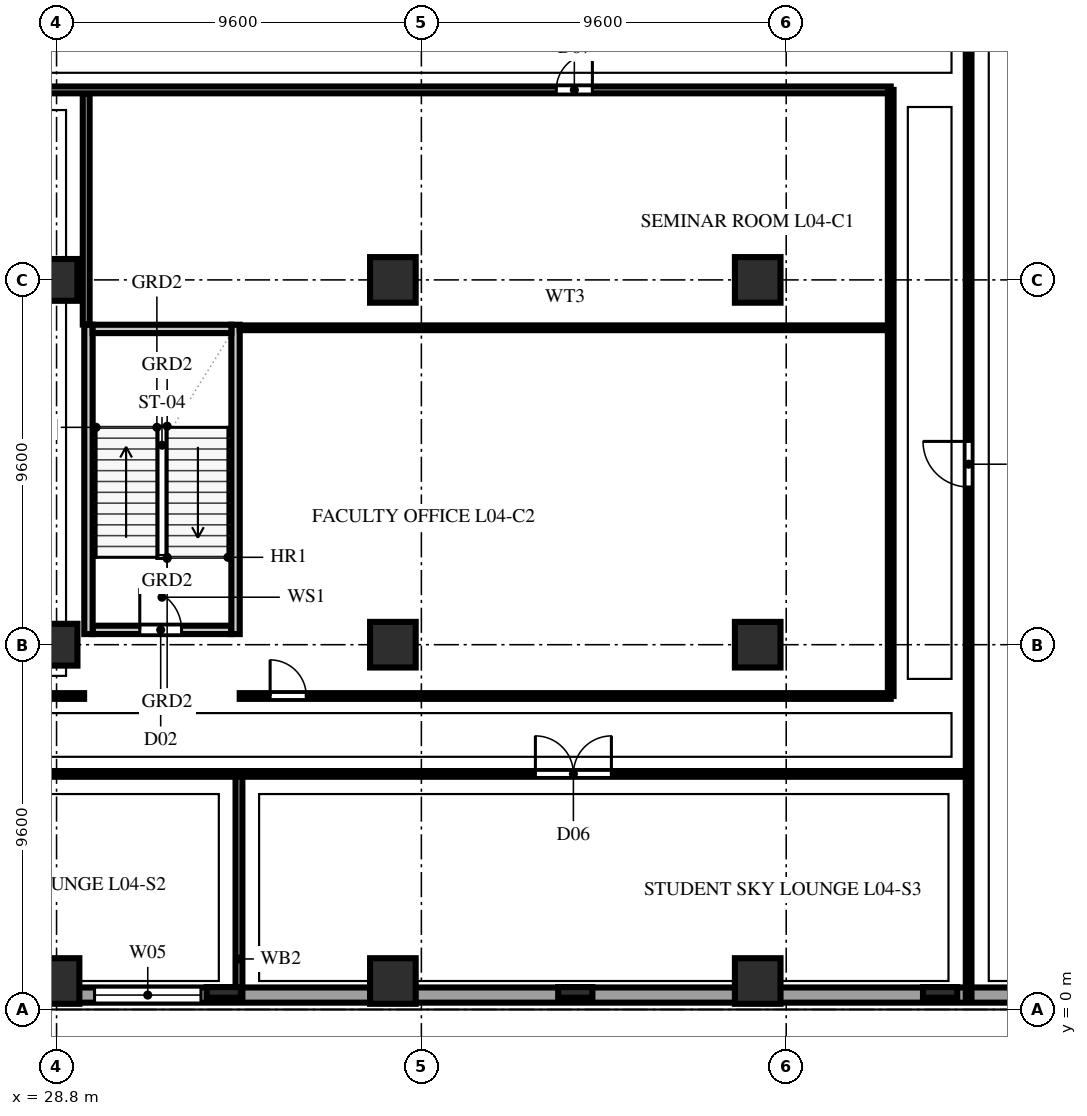
"""IFC4 building model, lengths in metres.
Left out: names, types, materials, properties, quantities, classifications, styles, units other than length and angle.
Written with IfcOpenShell. Run it as: python <this file> out.ifc"""

import sys

from ifc_helpers import new_model, si_unit, direction, frame, frame_2d, origin, origin_2d, place, context, subcontext, project, spatial, rectangle, extrude, element, fill, save


model = new_model("IFC4")
c1 = context("Model", 3, precision=1e-05, world=origin(), true_north=direction((0.0, 1.0)))
c2 = subcontext(c1, "Body", "Model", "MODEL_VIEW")
j1 = project(units=[si_unit("LENGTHUNIT", "METRE"), si_unit("PLANEANGLEUNIT", "RADIAN")], contexts=[c1])
p1 = place(None, origin())
s1 = spatial("IfcSite", under=j1, at=p1, CompositionType="ELEMENT")
p2 = place(p1, origin())
s2 = spatial("IfcBuilding", under=s1, at=p2, CompositionType="ELEMENT")
p3 = place(p2, frame((0.0, 0.0, 19.6)))
s3 = spatial("IfcBuildingStorey", under=s2, at=p3, CompositionType="ELEMENT", Elevation=19.6)
p4 = place(p3, frame((28.8, 0.75, 0.0), z_axis=(0.0, 0.0, 1.0), x_axis=(1.0, 0.0, 0.0)))
e1 = element("IfcColumn", 1, at=p4, inside=s3, PredefinedType="COLUMN", context=c2, shape_type="SweptSolid", body=[
    extrude(rectangle(XDim=1.2, YDim=1.2, at=origin_2d()), origin(), (0.0, 0.0, 1.0), 4.6),
])
for number, where, z_axis, x_axis in (
    (2, (28.8, 9.6, 0.0), (0.0, 0.0, 1.0), (1.0, 0.0, 0.0)),
    (3, (28.8, 19.2, 0.0), (0.0, 0.0, 1.0), (1.0, 0.0, 0.0)),
):
    element("IfcColumn", number, at=place(p3, frame(where, z_axis=z_axis, x_axis=x_axis)), inside=s3, PredefinedType="COLUMN", context=c2, shape_type="SweptSolid", body=[
        extrude(rectangle(XDim=1.1, YDim=1.1, at=origin_2d()), origin(), (0.0, 0.0, 1.0), 4.6),
    ])
for number, where, z_axis, x_axis in (
    (4, (37.65, 0.75, 0.0), (0.0, 0.0, 1.0), (1.0, 0.0, 0.0)),
    (5, (37.65, 9.6, 0.0), (0.0, 0.0, 1.0), (1.0, 0.0, 0.0)),
    (6, (37.65, 19.2, 0.0), (0.0, 0.0, 1.0), (1.0, 0.0, 0.0)),
    (7, (47.25, 0.75, 0.0), (0.0, 0.0, 1.0), (1.0, 0.0, 0.0)),
    (8, (47.25, 9.6, 0.0), (0.0, 0.0, 1.0), (1.0, 0.0, 0.0)),
    (9, (47.25, 19.2, 0.0), (0.0, 0.0, 1.0), (1.0, 0.0, 0.0)),
):
    element("IfcColumn", number, at=place(p3, frame(where, z_axis=z_axis, x_axis=x_axis)), inside=s3, PredefinedType="COLUMN", context=c2, shape_type="SweptSolid", body=[
        extrude(rectangle(XDim=1.2, YDim=1.2, at=origin_2d()), origin(), (0.0, 0.0, 1.0), 4.6),
    ])
for number, where, z_axis, x_axis in (
    (10, (33.2, 0.45, 0.0), (0.0, 0.0, 1.0), (1.0, 0.0, 0.0)),
    (11, (42.45, 0.45, 0.0), (0.0, 0.0, 1.0), (1.0, 0.0, 0.0)),
    (12, (52.05, 0.45, 0.0), (0.0, 0.0, 1.0), (1.0, 0.0, 0.0)),
):
    element("IfcColumn", number, at=place(p3, frame(where, z_axis=z_axis, x_axis=x_axis)), inside=s3, PredefinedType="PILASTER", context=c2, shape_type="SweptSolid", body=[
        extrude(rectangle(XDim=0.9, YDim=0.28, at=origin_2d()), origin(), (0.0, 0.0, 1.0), 4.6),
    ])
p5 = place(p3, frame((1.84, 0.38, 0.0), z_axis=(0.0, 0.0, 1.0), x_axis=(1.0, 0.0, 0.0)))
e13 = element("IfcWall", 13, at=p5, inside=s3, PredefinedType="SOLIDWALL", context=c2, shape_type="SweptSolid", body=[
    extrude(rectangle(XDim=63.52, YDim=0.4, at=frame_2d((31.76, 0.0))), origin(), (0.0, 0.0, 1.0), 4.34),
])
p6 = place(p5, frame((3.96, 0.0, 0.75)))
e14 = element("IfcOpeningElement", 14, at=p6, cuts=e13, PredefinedType="OPENING", context=c2, shape_type="SweptSolid", body=[
    extrude(rectangle(XDim=2.8, YDim=2.3, at=frame_2d((1.4, 1.15))), frame((0.0, 0.212, 0.0), z_axis=(0.0, -1.0, 0.0), x_axis=(1.0, 0.0, 0.0)), (0.0, 0.0, 1.0), 0.424),
])
p7 = place(p5, frame((8.76, 0.0, 0.75)))
e15 = element("IfcOpeningElement", 15, at=p7, cuts=e13, PredefinedType="OPENING", context=c2, shape_type="SweptSolid", body=[
    extrude(rectangle(XDim=2.8, YDim=2.3, at=frame_2d((1.4, 1.15))), frame((0.0, 0.212, 0.0), z_axis=(0.0, -1.0, 0.0), x_axis=(1.0, 0.0, 0.0)), (0.0, 0.0, 1.0), 0.424),
])
p8 = place(p5, frame((13.56, 0.0, 0.75)))
e16 = element("IfcOpeningElement", 16, at=p8, cuts=e13, PredefinedType="OPENING", context=c2, shape_type="SweptSolid", body=[
    extrude(rectangle(XDim=2.8, YDim=2.3, at=frame_2d((1.4, 1.15))), frame((0.0, 0.212, 0.0), z_axis=(0.0, -1.0, 0.0), x_axis=(1.0, 0.0, 0.0)), (0.0, 0.0, 1.0), 0.424),
])
p9 = place(p5, frame((18.36, 0.0, 0.75)))
e17 = element("IfcOpeningElement", 17, at=p9, cuts=e13, PredefinedType="OPENING", context=c2, shape_type="SweptSolid", body=[
    extrude(rectangle(XDim=2.8, YDim=2.3, at=frame_2d((1.4, 1.15))), frame((0.0, 0.212, 0.0), z_axis=(0.0, -1.0, 0.0), x_axis=(1.0, 0.0, 0.0)), (0.0, 0.0, 1.0), 0.424),
])
p10 = place(p5, frame((23.16, 0.0, 0.75)))
e18 = element("IfcOpeningElement", 18, at=p10, cuts=e13, PredefinedType="OPENING", context=c2, shape_type="SweptSolid", body=[
    extrude(rectangle(XDim=2.8, YDim=2.3, at=frame_2d((1.4, 1.15))), frame((0.0, 0.212, 0.0), z_axis=(0.0, -1.0, 0.0), x_axis=(1.0, 0.0, 0.0)), (0.0, 0.0, 1.0), 0.424),
])
p11 = place(p5, frame((27.96, 0.0, 0.75)))
e19 = element("IfcOpeningElement", 19, at=p11, cuts=e13, PredefinedType="OPENING", context=c2, shape_type="SweptSolid", body=[
    extrude(rectangle(XDim=2.8, YDim=2.3, at=frame_2d((1.4, 1.15))), frame((0.0, 0.212, 0.0), z_axis=(0.0, -1.0, 0.0), x_axis=(1.0, 0.0, 0.0)), (0.0, 0.0, 1.0), 0.424),
])
p12 = place(p3, frame((29.75, 9.99, 0.0), z_axis=(0.0, 0.0, 1.0), x_axis=(1.0, 0.0, 0.0)))
e20 = element("IfcWall", 20, at=p12, inside=s3, PredefinedType="SOLIDWALL", context=c2, shape_type="SweptSolid", body=[
    extrude(rectangle(XDim=3.65, YDim=0.22, at=frame_2d((1.825, 0.0))), origin(), (0.0, 0.0, 1.0), 4.34),
])
p13 = place(p12, frame((1.24, 0.0, 0.0)))
e21 = element("IfcOpeningElement", 21, at=p13, cuts=e20, PredefinedType="OPENING", context=c2, shape_type="SweptSolid", body=[
    extrude(rectangle(XDim=1.1, YDim=2.2, at=frame_2d((0.55, 1.1))), frame((0.0, 0.122, 0.0), z_axis=(0.0, -1.0, 0.0), x_axis=(1.0, 0.0, 0.0)), (0.0, 0.0, 1.0), 0.244),
])
for number, where, z_axis, x_axis in (
    (22, (29.64, 9.88, 0.0), (0.0, 0.0, 1.0), (0.0, 1.0, 0.0)),
    (23, (33.51, 9.88, 0.0), (0.0, 0.0, 1.0), (0.0, 1.0, 0.0)),
):
    element("IfcWall", number, at=place(p3, frame(where, z_axis=z_axis, x_axis=x_axis)), inside=s3, PredefinedType="SOLIDWALL", context=c2, shape_type="SweptSolid", body=[
        extrude(rectangle(XDim=8.14, YDim=0.22, at=frame_2d((4.07, 0.0))), origin(), (0.0, 0.0, 1.0), 4.34),
    ])
p14 = place(p3, frame((29.75, 17.91, 0.0), z_axis=(0.0, 0.0, 1.0), x_axis=(1.0, 0.0, 0.0)))
e24 = element("IfcWall", 24, at=p14, inside=s3, PredefinedType="SOLIDWALL", context=c2, shape_type="SweptSolid", body=[
    extrude(rectangle(XDim=3.65, YDim=0.22, at=frame_2d((1.825, 0.0))), origin(), (0.0, 0.0, 1.0), 4.34),
])
p15 = place(p3, frame((33.6, 0.22, 0.0), z_axis=(0.0, 0.0, 1.0), x_axis=(0.0, 1.0, 0.0)))
e25 = element("IfcWall", 25, at=p15, inside=s3, PredefinedType="PARTITIONING", context=c2, shape_type="SweptSolid", body=[
    extrude(rectangle(XDim=5.98, YDim=0.18, at=frame_2d((2.99, 0.0))), origin(), (0.0, 0.0, 1.0), 4.34),
])
p16 = place(p3, frame((0.22, 6.2, 0.0), z_axis=(0.0, 0.0, 1.0), x_axis=(1.0, 0.0, 0.0)))
e26 = element("IfcWall", 26, at=p16, inside=s3, PredefinedType="PARTITIONING", context=c2, shape_type="SweptSolid", body=[
    extrude(rectangle(XDim=52.58, YDim=0.15, at=frame_2d((26.29, 0.0))), origin(), (0.0, 0.0, 1.0), 4.34),
])
p17 = place(p16, frame((13.58, 0.0, 0.0)))
e27 = element("IfcOpeningElement", 27, at=p17, cuts=e26, PredefinedType="OPENING", context=c2, shape_type="SweptSolid", body=[
    extrude(rectangle(XDim=1.2, YDim=2.2, at=frame_2d((0.6, 1.1))), frame((0.0, 0.087, 0.0), z_axis=(0.0, -1.0, 0.0), x_axis=(1.0, 0.0, 0.0)), (0.0, 0.0, 1.0), 0.174),
])
p18 = place(p16, frame((23.28, 0.0, 0.0)))
e28 = element("IfcOpeningElement", 28, at=p18, cuts=e26, PredefinedType="OPENING", context=c2, shape_type="SweptSolid", body=[
    extrude(rectangle(XDim=1.2, YDim=2.2, at=frame_2d((0.6, 1.1))), frame((0.0, 0.087, 0.0), z_axis=(0.0, -1.0, 0.0), x_axis=(1.0, 0.0, 0.0)), (0.0, 0.0, 1.0), 0.174),
])
p19 = place(p16, frame((41.18, 0.0, 0.0)))
e29 = element("IfcOpeningElement", 29, at=p19, cuts=e26, PredefinedType="OPENING", context=c2, shape_type="SweptSolid", body=[
    extrude(rectangle(XDim=2.0, YDim=2.3, at=frame_2d((1.0, 1.15))), frame((0.0, 0.087, 0.0), z_axis=(0.0, -1.0, 0.0), x_axis=(1.0, 0.0, 0.0)), (0.0, 0.0, 1.0), 0.174),
])
p20 = place(p3, frame((52.8, 0.22, 0.0), z_axis=(0.0, 0.0, 1.0), x_axis=(0.0, 1.0, 0.0)))
e30 = element("IfcWall", 30, at=p20, inside=s3, PredefinedType="PARTITIONING", context=c2, shape_type="SweptSolid", body=[
    extrude(rectangle(XDim=37.96, YDim=0.15, at=frame_2d((18.98, 0.0))), origin(), (0.0, 0.0, 1.0), 4.34),
])
p21 = place(p20, frame((13.53, 0.0, 0.0)))
e31 = element("IfcOpeningElement", 31, at=p21, cuts=e30, PredefinedType="OPENING", context=c2, shape_type="SweptSolid", body=[
    extrude(rectangle(XDim=1.2, YDim=2.2, at=frame_2d((0.6, 1.1))), frame((0.0, 0.087, 0.0), z_axis=(0.0, -1.0, 0.0), x_axis=(1.0, 0.0, 0.0)), (0.0, 0.0, 1.0), 0.174),
])
p22 = place(p3, frame((29.58, 18.025, 0.0), z_axis=(0.0, 0.0, 1.0), x_axis=(0.0, 1.0, 0.0)))
e32 = element("IfcWall", 32, at=p22, inside=s3, PredefinedType="PARTITIONING", context=c2, shape_type="SweptSolid", body=[
    extrude(rectangle(XDim=6.08, YDim=0.18, at=frame_2d((3.04, 0.0))), origin(), (0.0, 0.0, 1.0), 4.34),
])
p23 = place(p3, frame((19.28, 24.2, 0.0), z_axis=(0.0, 0.0, 1.0), x_axis=(1.0, 0.0, 0.0)))
e33 = element("IfcWall", 33, at=p23, inside=s3, PredefinedType="PARTITIONING", context=c2, shape_type="SweptSolid", body=[
    extrude(rectangle(XDim=31.47, YDim=0.18, at=frame_2d((15.735, 0.0))), origin(), (0.0, 0.0, 1.0), 4.34),
])
p24 = place(p23, frame((22.67, 0.0, 0.0)))
e34 = element("IfcOpeningElement", 34, at=p24, cuts=e33, PredefinedType="OPENING", context=c2, shape_type="SweptSolid", body=[
    extrude(rectangle(XDim=0.95, YDim=2.15, at=frame_2d((0.475, 1.075))), frame((0.0, 0.102, 0.0), z_axis=(0.0, -1.0, 0.0), x_axis=(1.0, 0.0, 0.0)), (0.0, 0.0, 1.0), 0.204),
])
p25 = place(p3, frame((19.28, 8.25, 0.0), z_axis=(0.0, 0.0, 1.0), x_axis=(1.0, 0.0, 0.0)))
e35 = element("IfcWall", 35, at=p25, inside=s3, PredefinedType="PARTITIONING", context=c2, shape_type="SweptSolid", body=[
    extrude(rectangle(XDim=10.245, YDim=0.15, at=frame_2d((5.123, 0.0))), origin(), (0.0, 0.0, 1.0), 4.34),
])
p26 = place(p3, frame((33.62, 17.94, 0.0), z_axis=(0.0, 0.0, 1.0), x_axis=(1.0, 0.0, 0.0)))
e36 = element("IfcWall", 36, at=p26, inside=s3, PredefinedType="PARTITIONING", context=c2, shape_type="SweptSolid", body=[
    extrude(rectangle(XDim=17.13, YDim=0.125, at=frame_2d((8.565, 0.0))), origin(), (0.0, 0.0, 1.0), 4.34),
])
p27 = place(p3, frame((33.62, 8.25, 0.0), z_axis=(0.0, 0.0, 1.0), x_axis=(1.0, 0.0, 0.0)))
e37 = element("IfcWall", 37, at=p27, inside=s3, PredefinedType="PARTITIONING", context=c2, shape_type="SweptSolid", body=[
    extrude(rectangle(XDim=17.13, YDim=0.15, at=frame_2d((8.565, 0.0))), origin(), (0.0, 0.0, 1.0), 4.34),
])
p28 = place(p27, frame((0.8, 0.0, 0.0)))
e38 = element("IfcOpeningElement", 38, at=p28, cuts=e37, PredefinedType="OPENING", context=c2, shape_type="SweptSolid", body=[
    extrude(rectangle(XDim=0.95, YDim=2.15, at=frame_2d((0.475, 1.075))), frame((0.0, 0.087, 0.0), z_axis=(0.0, -1.0, 0.0), x_axis=(1.0, 0.0, 0.0)), (0.0, 0.0, 1.0), 0.174),
])
p29 = place(p3, frame((50.75, 8.25, 0.0), z_axis=(0.0, 0.0, 1.0), x_axis=(0.0, 1.0, 0.0)))
e39 = element("IfcWall", 39, at=p29, inside=s3, PredefinedType="PARTITIONING", context=c2, shape_type="SweptSolid", body=[
    extrude(rectangle(XDim=15.95, YDim=0.15, at=frame_2d((7.975, 0.0))), origin(), (0.0, 0.0, 1.0), 4.34),
])
p30 = place(p11, origin())
e40 = element("IfcWindow", 40, at=p30, inside=s3, PartitioningType="TRIPLE_PANEL_VERTICAL", PredefinedType="WINDOW", context=c2, shape_type="SweptSolid", body=[
    extrude(rectangle(XDim=2.8, YDim=2.3, at=frame_2d((1.4, 1.15))), frame((0.0, 0.11, 0.0), z_axis=(0.0, -1.0, 0.0), x_axis=(1.0, 0.0, 0.0)), (0.0, 0.0, 1.0), 0.06),
])
fill(e19, e40)
p31 = place(p13, origin())
e41 = element("IfcDoor", 41, at=p31, inside=s3, OperationType="SINGLE_SWING_LEFT", PredefinedType="DOOR", context=c2, shape_type="SweptSolid", body=[
    extrude(rectangle(XDim=1.1, YDim=2.2, at=frame_2d((0.55, 1.1))), frame((0.0, 0.025, 0.0), z_axis=(0.0, -1.0, 0.0), x_axis=(1.0, 0.0, 0.0)), (0.0, 0.0, 1.0), 0.05),
])
fill(e21, e41)
p32 = place(p19, origin())
e42 = element("IfcDoor", 42, at=p32, inside=s3, OperationType="DOUBLE_SWING_LEFT", PredefinedType="DOOR", context=c2, shape_type="SweptSolid", body=[
    extrude(rectangle(XDim=2.0, YDim=2.3, at=frame_2d((1.0, 1.15))), frame((0.0, 0.025, 0.0), z_axis=(0.0, -1.0, 0.0), x_axis=(1.0, 0.0, 0.0)), (0.0, 0.0, 1.0), 0.05),
])
fill(e29, e42)
p33 = place(p21, origin())
e43 = element("IfcDoor", 43, at=p33, inside=s3, OperationType="SINGLE_SWING_RIGHT", PredefinedType="DOOR", context=c2, shape_type="SweptSolid", body=[
    extrude(rectangle(XDim=1.2, YDim=2.2, at=frame_2d((0.6, 1.1))), frame((0.0, 0.025, 0.0), z_axis=(0.0, -1.0, 0.0), x_axis=(1.0, 0.0, 0.0)), (0.0, 0.0, 1.0), 0.05),
])
fill(e31, e43)
p34 = place(p24, origin())
e44 = element("IfcDoor", 44, at=p34, inside=s3, OperationType="SINGLE_SWING_RIGHT", PredefinedType="DOOR", context=c2, shape_type="SweptSolid", body=[
    extrude(rectangle(XDim=0.95, YDim=2.15, at=frame_2d((0.475, 1.075))), frame((0.0, 0.025, 0.0), z_axis=(0.0, -1.0, 0.0), x_axis=(1.0, 0.0, 0.0)), (0.0, 0.0, 1.0), 0.05),
])
fill(e34, e44)
p35 = place(p28, origin())
e45 = element("IfcDoor", 45, at=p35, inside=s3, OperationType="SINGLE_SWING_LEFT", PredefinedType="DOOR", context=c2, shape_type="SweptSolid", body=[
    extrude(rectangle(XDim=0.95, YDim=2.15, at=frame_2d((0.475, 1.075))), frame((0.0, 0.025, 0.0), z_axis=(0.0, -1.0, 0.0), x_axis=(1.0, 0.0, 0.0)), (0.0, 0.0, 1.0), 0.05),
])
fill(e38, e45)
save(model, sys.argv[1])
